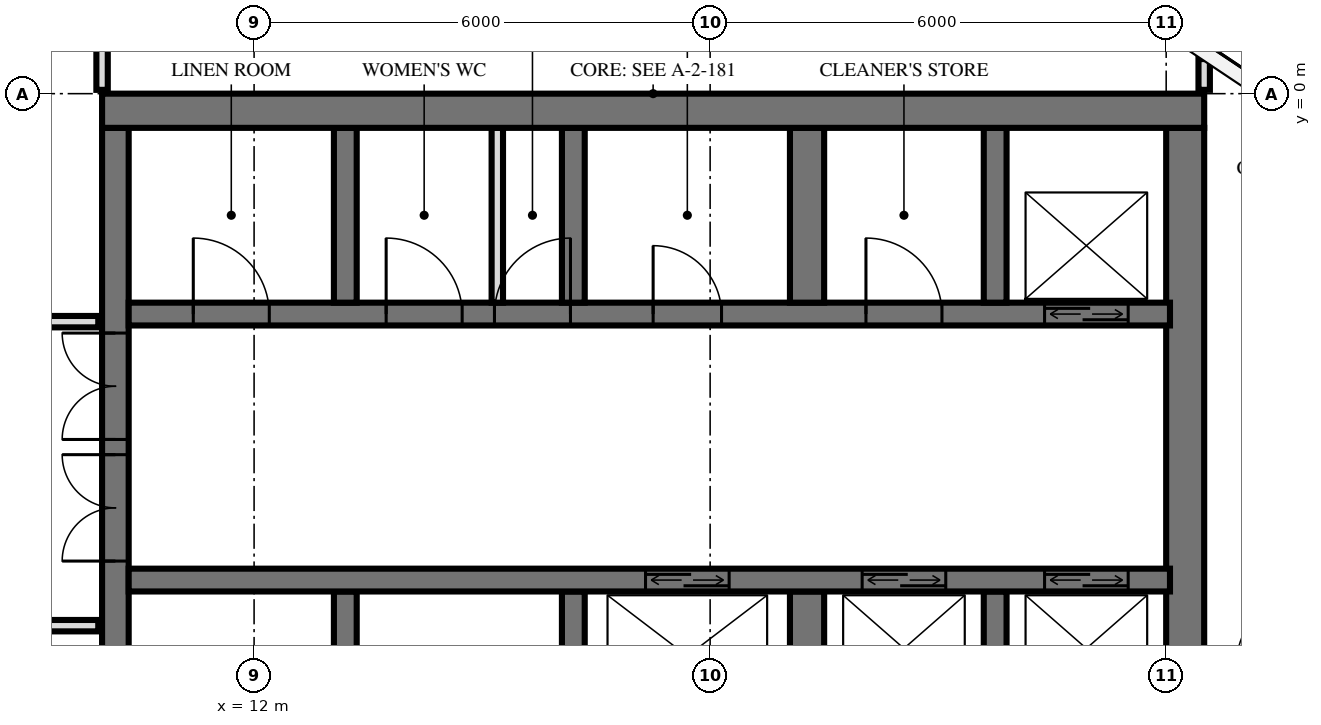
"""IFC4 building model, lengths in metres.
Left out: names, types, materials, properties, quantities, classifications, styles, units other than length and angle.
Written with IfcOpenShell. Run it as: python <this file> out.ifc"""

import sys

from ifc_helpers import new_model, si_unit, direction, frame, frame_2d, origin, place, context, subcontext, project, spatial, rectangle, extrude, element, fill, save


model = new_model("IFC4")
c1 = context("Model", 3, precision=1e-05, world=origin(), true_north=direction((0.0, 1.0)))
c2 = subcontext(c1, "Body", "Model", "MODEL_VIEW")
j1 = project(units=[si_unit("LENGTHUNIT", "METRE"), si_unit("PLANEANGLEUNIT", "RADIAN")], contexts=[c1])
p1 = place(None, origin())
s1 = spatial("IfcSite", under=j1, at=p1, CompositionType="ELEMENT")
p2 = place(p1, origin())
s2 = spatial("IfcBuilding", under=s1, at=p2, CompositionType="ELEMENT")
p3 = place(p2, frame((0.0, 0.0, 177.6)))
s3 = spatial("IfcBuildingStorey", under=s2, at=p3, CompositionType="ELEMENT", Elevation=177.6)
p4 = place(p3, frame((10.0, -0.225, 0.0), z_axis=(0.0, 0.0, 1.0), x_axis=(1.0, 0.0, 0.0)))
e1 = element("IfcWall", 1, at=p4, inside=s3, PredefinedType="SHEAR", context=c2, shape_type="SweptSolid", body=[
    extrude(rectangle(XDim=14.5, YDim=0.45, at=frame_2d((7.25, 0.0))), origin(), (0.0, 0.0, 1.0), 6.0),
])
p5 = place(p3, frame((10.175, -14.55, 0.0), z_axis=(0.0, 0.0, 1.0), x_axis=(0.0, 1.0, 0.0)))
e2 = element("IfcWall", 2, at=p5, inside=s3, PredefinedType="SHEAR", context=c2, shape_type="SweptSolid", body=[
    extrude(rectangle(XDim=14.1, YDim=0.35, at=frame_2d((7.05, 0.0))), origin(), (0.0, 0.0, 1.0), 6.0),
])
p6 = place(p5, frame((8.4, 0.0, 0.0)))
e3 = element("IfcOpeningElement", 3, at=p6, cuts=e2, PredefinedType="OPENING", context=c2, shape_type="SweptSolid", body=[
    extrude(rectangle(XDim=1.4, YDim=2.4, at=frame_2d((0.7, 1.2))), frame((0.0, 0.185, 0.0), z_axis=(0.0, -1.0, 0.0), x_axis=(1.0, 0.0, 0.0)), (0.0, 0.0, 1.0), 0.37),
])
p7 = place(p5, frame((10.0, 0.0, 0.0)))
e4 = element("IfcOpeningElement", 4, at=p7, cuts=e2, PredefinedType="OPENING", context=c2, shape_type="SweptSolid", body=[
    extrude(rectangle(XDim=1.4, YDim=2.4, at=frame_2d((0.7, 1.2))), frame((0.0, 0.185, 0.0), z_axis=(0.0, -1.0, 0.0), x_axis=(1.0, 0.0, 0.0)), (0.0, 0.0, 1.0), 0.37),
])
p8 = place(p5, frame((4.0, 0.0, 0.0)))
e5 = element("IfcOpeningElement", 5, at=p8, cuts=e2, PredefinedType="OPENING", context=c2, shape_type="SweptSolid", body=[
    extrude(rectangle(XDim=1.2, YDim=2.1, at=frame_2d((0.6, 1.05))), frame((0.0, 0.185, 0.0), z_axis=(0.0, -1.0, 0.0), x_axis=(1.0, 0.0, 0.0)), (0.0, 0.0, 1.0), 0.37),
])
p9 = place(p3, frame((24.25, -14.55, 0.0), z_axis=(0.0, 0.0, 1.0), x_axis=(0.0, 1.0, 0.0)))
e6 = element("IfcWall", 6, at=p9, inside=s3, PredefinedType="SHEAR", context=c2, shape_type="SweptSolid", body=[
    extrude(rectangle(XDim=14.1, YDim=0.5, at=frame_2d((7.05, 0.0))), origin(), (0.0, 0.0, 1.0), 6.0),
])
p10 = place(p3, frame((10.35, -2.9, 0.0), z_axis=(0.0, 0.0, 1.0), x_axis=(1.0, 0.0, 0.0)))
e7 = element("IfcWall", 7, at=p10, inside=s3, PredefinedType="SHEAR", context=c2, shape_type="SweptSolid", body=[
    extrude(rectangle(XDim=13.7, YDim=0.3, at=frame_2d((6.85, 0.0))), origin(), (0.0, 0.0, 1.0), 6.0),
])
p11 = place(p10, frame((12.05, 0.0, 0.0)))
e8 = element("IfcOpeningElement", 8, at=p11, cuts=e7, PredefinedType="OPENING", context=c2, shape_type="SweptSolid", body=[
    extrude(rectangle(XDim=1.1, YDim=2.1, at=frame_2d((0.55, 1.05))), frame((0.0, 0.16, 0.0), z_axis=(0.0, -1.0, 0.0), x_axis=(1.0, 0.0, 0.0)), (0.0, 0.0, 1.0), 0.32),
])
p12 = place(p10, frame((6.9, 0.0, 0.0)))
e9 = element("IfcOpeningElement", 9, at=p12, cuts=e7, PredefinedType="OPENING", context=c2, shape_type="SweptSolid", body=[
    extrude(rectangle(XDim=0.9, YDim=2.1, at=frame_2d((0.45, 1.05))), frame((0.0, 0.16, 0.0), z_axis=(0.0, -1.0, 0.0), x_axis=(1.0, 0.0, 0.0)), (0.0, 0.0, 1.0), 0.32),
])
p13 = place(p10, frame((0.85, 0.0, 0.0)))
e10 = element("IfcOpeningElement", 10, at=p13, cuts=e7, PredefinedType="OPENING", context=c2, shape_type="SweptSolid", body=[
    extrude(rectangle(XDim=1.0, YDim=2.1, at=frame_2d((0.5, 1.05))), frame((0.0, 0.16, 0.0), z_axis=(0.0, -1.0, 0.0), x_axis=(1.0, 0.0, 0.0)), (0.0, 0.0, 1.0), 0.32),
])
p14 = place(p10, frame((3.387, 0.0, 0.0)))
e11 = element("IfcOpeningElement", 11, at=p14, cuts=e7, PredefinedType="OPENING", context=c2, shape_type="SweptSolid", body=[
    extrude(rectangle(XDim=1.0, YDim=2.1, at=frame_2d((0.5, 1.05))), frame((0.0, 0.16, 0.0), z_axis=(0.0, -1.0, 0.0), x_axis=(1.0, 0.0, 0.0)), (0.0, 0.0, 1.0), 0.32),
])
p15 = place(p10, frame((4.812, 0.0, 0.0)))
e12 = element("IfcOpeningElement", 12, at=p15, cuts=e7, PredefinedType="OPENING", context=c2, shape_type="SweptSolid", body=[
    extrude(rectangle(XDim=1.0, YDim=2.1, at=frame_2d((0.5, 1.05))), frame((0.0, 0.16, 0.0), z_axis=(0.0, -1.0, 0.0), x_axis=(1.0, 0.0, 0.0)), (0.0, 0.0, 1.0), 0.32),
])
p16 = place(p10, frame((9.7, 0.0, 0.0)))
e13 = element("IfcOpeningElement", 13, at=p16, cuts=e7, PredefinedType="OPENING", context=c2, shape_type="SweptSolid", body=[
    extrude(rectangle(XDim=1.0, YDim=2.1, at=frame_2d((0.5, 1.05))), frame((0.0, 0.16, 0.0), z_axis=(0.0, -1.0, 0.0), x_axis=(1.0, 0.0, 0.0)), (0.0, 0.0, 1.0), 0.32),
])
p17 = place(p3, frame((10.35, -6.4, 0.0), z_axis=(0.0, 0.0, 1.0), x_axis=(1.0, 0.0, 0.0)))
e14 = element("IfcWall", 14, at=p17, inside=s3, PredefinedType="SHEAR", context=c2, shape_type="SweptSolid", body=[
    extrude(rectangle(XDim=13.7, YDim=0.3, at=frame_2d((6.85, 0.0))), origin(), (0.0, 0.0, 1.0), 6.0),
])
p18 = place(p17, frame((9.65, 0.0, 0.0)))
e15 = element("IfcOpeningElement", 15, at=p18, cuts=e14, PredefinedType="OPENING", context=c2, shape_type="SweptSolid", body=[
    extrude(rectangle(XDim=1.1, YDim=2.1, at=frame_2d((0.55, 1.05))), frame((0.0, 0.16, 0.0), z_axis=(0.0, -1.0, 0.0), x_axis=(1.0, 0.0, 0.0)), (0.0, 0.0, 1.0), 0.32),
])
p19 = place(p17, frame((12.05, 0.0, 0.0)))
e16 = element("IfcOpeningElement", 16, at=p19, cuts=e14, PredefinedType="OPENING", context=c2, shape_type="SweptSolid", body=[
    extrude(rectangle(XDim=1.1, YDim=2.1, at=frame_2d((0.55, 1.05))), frame((0.0, 0.16, 0.0), z_axis=(0.0, -1.0, 0.0), x_axis=(1.0, 0.0, 0.0)), (0.0, 0.0, 1.0), 0.32),
])
p20 = place(p17, frame((6.8, 0.0, 0.0)))
e17 = element("IfcOpeningElement", 17, at=p20, cuts=e14, PredefinedType="OPENING", context=c2, shape_type="SweptSolid", body=[
    extrude(rectangle(XDim=1.1, YDim=2.1, at=frame_2d((0.55, 1.05))), frame((0.0, 0.16, 0.0), z_axis=(0.0, -1.0, 0.0), x_axis=(1.0, 0.0, 0.0)), (0.0, 0.0, 1.0), 0.32),
])
for number, where, z_axis, x_axis in (
    (18, (13.2, -2.75, 0.0), (0.0, 0.0, 1.0), (0.0, 1.0, 0.0)),
    (19, (13.2, -8.85, 0.0), (0.0, 0.0, 1.0), (0.0, 1.0, 0.0)),
    (20, (16.2, -2.75, 0.0), (0.0, 0.0, 1.0), (0.0, 1.0, 0.0)),
    (21, (16.2, -8.85, 0.0), (0.0, 0.0, 1.0), (0.0, 1.0, 0.0)),
):
    element("IfcWall", number, at=place(p3, frame(where, z_axis=z_axis, x_axis=x_axis)), inside=s3, PredefinedType="SHEAR", context=c2, shape_type="SweptSolid", body=[
        extrude(rectangle(XDim=2.3, YDim=0.3, at=frame_2d((1.15, 0.0))), origin(), (0.0, 0.0, 1.0), 6.0),
    ])
for number, where, z_axis, x_axis in (
    (22, (19.275, -2.75, 0.0), (0.0, 0.0, 1.0), (0.0, 1.0, 0.0)),
    (23, (19.275, -8.85, 0.0), (0.0, 0.0, 1.0), (0.0, 1.0, 0.0)),
):
    element("IfcWall", number, at=place(p3, frame(where, z_axis=z_axis, x_axis=x_axis)), inside=s3, PredefinedType="SHEAR", context=c2, shape_type="SweptSolid", body=[
        extrude(rectangle(XDim=2.3, YDim=0.45, at=frame_2d((1.15, 0.0))), origin(), (0.0, 0.0, 1.0), 6.0),
    ])
for number, where, z_axis, x_axis in (
    (24, (21.75, -2.75, 0.0), (0.0, 0.0, 1.0), (0.0, 1.0, 0.0)),
    (25, (21.75, -8.85, 0.0), (0.0, 0.0, 1.0), (0.0, 1.0, 0.0)),
):
    element("IfcWall", number, at=place(p3, frame(where, z_axis=z_axis, x_axis=x_axis)), inside=s3, PredefinedType="SHEAR", context=c2, shape_type="SweptSolid", body=[
        extrude(rectangle(XDim=2.3, YDim=0.3, at=frame_2d((1.15, 0.0))), origin(), (0.0, 0.0, 1.0), 6.0),
    ])
p21 = place(p3, frame((15.2, -2.75, 0.0), z_axis=(0.0, 0.0, 1.0), x_axis=(0.0, 1.0, 0.0)))
e26 = element("IfcWall", 26, at=p21, inside=s3, PredefinedType="PARTITIONING", context=c2, shape_type="SweptSolid", body=[
    extrude(rectangle(XDim=2.3, YDim=0.15, at=frame_2d((1.15, 0.0))), origin(), (0.0, 0.0, 1.0), 5.7),
])
p22 = place(p3, frame((24.5, 0.05, 0.0), z_axis=(0.0, 0.0, 1.0), x_axis=(0.0, 1.0, 0.0)))
e27 = element("IfcWall", 27, at=p22, inside=s3, PredefinedType="PARTITIONING", context=c2, shape_type="SweptSolid", body=[
    extrude(rectangle(XDim=0.405, YDim=0.15, at=frame_2d((0.203, 0.0))), origin(), (0.0, 0.0, 1.0), 5.7),
])
p23 = place(p3, frame((10.0, 0.05, 0.0), z_axis=(0.0, 0.0, 1.0), x_axis=(0.0, 1.0, 0.0)))
e28 = element("IfcWall", 28, at=p23, inside=s3, PredefinedType="PARTITIONING", context=c2, shape_type="SweptSolid", body=[
    extrude(rectangle(XDim=0.91, YDim=0.15, at=frame_2d((0.455, 0.0))), origin(), (0.0, 0.0, 1.0), 5.7),
])
p24 = place(p3, frame((-9.95, -7.0, 0.0), z_axis=(0.0, 0.0, 1.0), x_axis=(1.0, 0.0, 0.0)))
e29 = element("IfcWall", 29, at=p24, inside=s3, PredefinedType="PARTITIONING", context=c2, shape_type="SweptSolid", body=[
    extrude(rectangle(XDim=19.9, YDim=0.15, at=frame_2d((9.95, 0.0))), origin(), (0.0, 0.0, 1.0), 5.7),
])
p25 = place(p24, frame((9.45, 0.0, 0.0)))
e30 = element("IfcOpeningElement", 30, at=p25, cuts=e29, PredefinedType="OPENING", context=c2, shape_type="SweptSolid", body=[
    extrude(rectangle(XDim=1.0, YDim=2.1, at=frame_2d((0.5, 1.05))), frame((0.0, 0.085, 0.0), z_axis=(0.0, -1.0, 0.0), x_axis=(1.0, 0.0, 0.0)), (0.0, 0.0, 1.0), 0.17),
])
p26 = place(p24, frame((2.0, 0.0, 0.0)))
e31 = element("IfcOpeningElement", 31, at=p26, cuts=e29, PredefinedType="OPENING", context=c2, shape_type="SweptSolid", body=[
    extrude(rectangle(XDim=1.0, YDim=2.1, at=frame_2d((0.5, 1.05))), frame((0.0, 0.085, 0.0), z_axis=(0.0, -1.0, 0.0), x_axis=(1.0, 0.0, 0.0)), (0.0, 0.0, 1.0), 0.17),
])
p27 = place(p3, frame((-9.95, -3.0, 0.0), z_axis=(0.0, 0.0, 1.0), x_axis=(1.0, 0.0, 0.0)))
e32 = element("IfcWall", 32, at=p27, inside=s3, PredefinedType="PARTITIONING", context=c2, shape_type="SweptSolid", body=[
    extrude(rectangle(XDim=19.9, YDim=0.15, at=frame_2d((9.95, 0.0))), origin(), (0.0, 0.0, 1.0), 5.7),
])
p28 = place(p27, frame((2.0, 0.0, 0.0)))
e33 = element("IfcOpeningElement", 33, at=p28, cuts=e32, PredefinedType="OPENING", context=c2, shape_type="SweptSolid", body=[
    extrude(rectangle(XDim=1.0, YDim=2.1, at=frame_2d((0.5, 1.05))), frame((0.0, 0.085, 0.0), z_axis=(0.0, -1.0, 0.0), x_axis=(1.0, 0.0, 0.0)), (0.0, 0.0, 1.0), 0.17),
])
p29 = place(p27, frame((6.95, 0.0, 0.0)))
e34 = element("IfcOpeningElement", 34, at=p29, cuts=e32, PredefinedType="OPENING", context=c2, shape_type="SweptSolid", body=[
    extrude(rectangle(XDim=1.0, YDim=2.1, at=frame_2d((0.5, 1.05))), frame((0.0, 0.085, 0.0), z_axis=(0.0, -1.0, 0.0), x_axis=(1.0, 0.0, 0.0)), (0.0, 0.0, 1.0), 0.17),
])
p30 = place(p27, frame((9.7, 0.0, 0.0)))
e35 = element("IfcOpeningElement", 35, at=p30, cuts=e32, PredefinedType="OPENING", context=c2, shape_type="SweptSolid", body=[
    extrude(rectangle(XDim=1.0, YDim=2.1, at=frame_2d((0.5, 1.05))), frame((0.0, 0.085, 0.0), z_axis=(0.0, -1.0, 0.0), x_axis=(1.0, 0.0, 0.0)), (0.0, 0.0, 1.0), 0.17),
])
p31 = place(p27, frame((16.9, 0.0, 0.0)))
e36 = element("IfcOpeningElement", 36, at=p31, cuts=e32, PredefinedType="OPENING", context=c2, shape_type="SweptSolid", body=[
    extrude(rectangle(XDim=1.0, YDim=2.1, at=frame_2d((0.5, 1.05))), frame((0.0, 0.085, 0.0), z_axis=(0.0, -1.0, 0.0), x_axis=(1.0, 0.0, 0.0)), (0.0, 0.0, 1.0), 0.17),
])
p32 = place(p18, origin())
e37 = element("IfcDoor", 37, at=p32, inside=s3, OperationType="DOUBLE_DOOR_SLIDING", PredefinedType="USERDEFINED", context=c2, shape_type="SweptSolid", body=[
    extrude(rectangle(XDim=1.1, YDim=2.1, at=frame_2d((0.55, 1.05))), frame((0.0, 0.025, 0.0), z_axis=(0.0, -1.0, 0.0), x_axis=(1.0, 0.0, 0.0)), (0.0, 0.0, 1.0), 0.05),
])
fill(e15, e37)
p33 = place(p11, origin())
e38 = element("IfcDoor", 38, at=p33, inside=s3, OperationType="DOUBLE_DOOR_SLIDING", PredefinedType="USERDEFINED", context=c2, shape_type="SweptSolid", body=[
    extrude(rectangle(XDim=1.1, YDim=2.1, at=frame_2d((0.55, 1.05))), frame((0.0, 0.025, 0.0), z_axis=(0.0, -1.0, 0.0), x_axis=(1.0, 0.0, 0.0)), (0.0, 0.0, 1.0), 0.05),
])
fill(e8, e38)
p34 = place(p19, origin())
e39 = element("IfcDoor", 39, at=p34, inside=s3, OperationType="DOUBLE_DOOR_SLIDING", PredefinedType="USERDEFINED", context=c2, shape_type="SweptSolid", body=[
    extrude(rectangle(XDim=1.1, YDim=2.1, at=frame_2d((0.55, 1.05))), frame((0.0, 0.025, 0.0), z_axis=(0.0, -1.0, 0.0), x_axis=(1.0, 0.0, 0.0)), (0.0, 0.0, 1.0), 0.05),
])
fill(e16, e39)
p35 = place(p20, origin())
e40 = element("IfcDoor", 40, at=p35, inside=s3, OperationType="DOUBLE_DOOR_SLIDING", PredefinedType="USERDEFINED", context=c2, shape_type="SweptSolid", body=[
    extrude(rectangle(XDim=1.1, YDim=2.1, at=frame_2d((0.55, 1.05))), frame((0.0, 0.025, 0.0), z_axis=(0.0, -1.0, 0.0), x_axis=(1.0, 0.0, 0.0)), (0.0, 0.0, 1.0), 0.05),
])
fill(e17, e40)
p36 = place(p6, origin())
e41 = element("IfcDoor", 41, at=p36, inside=s3, OperationType="DOUBLE_DOOR_SINGLE_SWING", PredefinedType="DOOR", context=c2, shape_type="SweptSolid", body=[
    extrude(rectangle(XDim=1.4, YDim=2.4, at=frame_2d((0.7, 1.2))), frame((0.0, 0.025, 0.0), z_axis=(0.0, -1.0, 0.0), x_axis=(1.0, 0.0, 0.0)), (0.0, 0.0, 1.0), 0.05),
])
fill(e3, e41)
p37 = place(p7, origin())
e42 = element("IfcDoor", 42, at=p37, inside=s3, OperationType="DOUBLE_DOOR_SINGLE_SWING", PredefinedType="DOOR", context=c2, shape_type="SweptSolid", body=[
    extrude(rectangle(XDim=1.4, YDim=2.4, at=frame_2d((0.7, 1.2))), frame((0.0, 0.025, 0.0), z_axis=(0.0, -1.0, 0.0), x_axis=(1.0, 0.0, 0.0)), (0.0, 0.0, 1.0), 0.05),
])
fill(e4, e42)
p38 = place(p12, origin())
e43 = element("IfcDoor", 43, at=p38, inside=s3, OperationType="SINGLE_SWING_RIGHT", PredefinedType="DOOR", context=c2, shape_type="SweptSolid", body=[
    extrude(rectangle(XDim=0.9, YDim=2.1, at=frame_2d((0.45, 1.05))), frame((0.0, 0.025, 0.0), z_axis=(0.0, -1.0, 0.0), x_axis=(1.0, 0.0, 0.0)), (0.0, 0.0, 1.0), 0.05),
])
fill(e9, e43)
p39 = place(p13, origin())
e44 = element("IfcDoor", 44, at=p39, inside=s3, OperationType="SINGLE_SWING_RIGHT", PredefinedType="DOOR", context=c2, shape_type="SweptSolid", body=[
    extrude(rectangle(XDim=1.0, YDim=2.1, at=frame_2d((0.5, 1.05))), frame((0.0, 0.025, 0.0), z_axis=(0.0, -1.0, 0.0), x_axis=(1.0, 0.0, 0.0)), (0.0, 0.0, 1.0), 0.05),
])
fill(e10, e44)
p40 = place(p14, origin())
e45 = element("IfcDoor", 45, at=p40, inside=s3, OperationType="SINGLE_SWING_RIGHT", PredefinedType="DOOR", context=c2, shape_type="SweptSolid", body=[
    extrude(rectangle(XDim=1.0, YDim=2.1, at=frame_2d((0.5, 1.05))), frame((0.0, 0.025, 0.0), z_axis=(0.0, -1.0, 0.0), x_axis=(1.0, 0.0, 0.0)), (0.0, 0.0, 1.0), 0.05),
])
fill(e11, e45)
p41 = place(p15, origin())
e46 = element("IfcDoor", 46, at=p41, inside=s3, OperationType="SINGLE_SWING_LEFT", PredefinedType="DOOR", context=c2, shape_type="SweptSolid", body=[
    extrude(rectangle(XDim=1.0, YDim=2.1, at=frame_2d((0.5, 1.05))), frame((0.0, 0.025, 0.0), z_axis=(0.0, -1.0, 0.0), x_axis=(1.0, 0.0, 0.0)), (0.0, 0.0, 1.0), 0.05),
])
fill(e12, e46)
p42 = place(p16, origin())
e47 = element("IfcDoor", 47, at=p42, inside=s3, OperationType="SINGLE_SWING_RIGHT", PredefinedType="DOOR", context=c2, shape_type="SweptSolid", body=[
    extrude(rectangle(XDim=1.0, YDim=2.1, at=frame_2d((0.5, 1.05))), frame((0.0, 0.025, 0.0), z_axis=(0.0, -1.0, 0.0), x_axis=(1.0, 0.0, 0.0)), (0.0, 0.0, 1.0), 0.05),
])
fill(e13, e47)
save(model, sys.argv[1])
